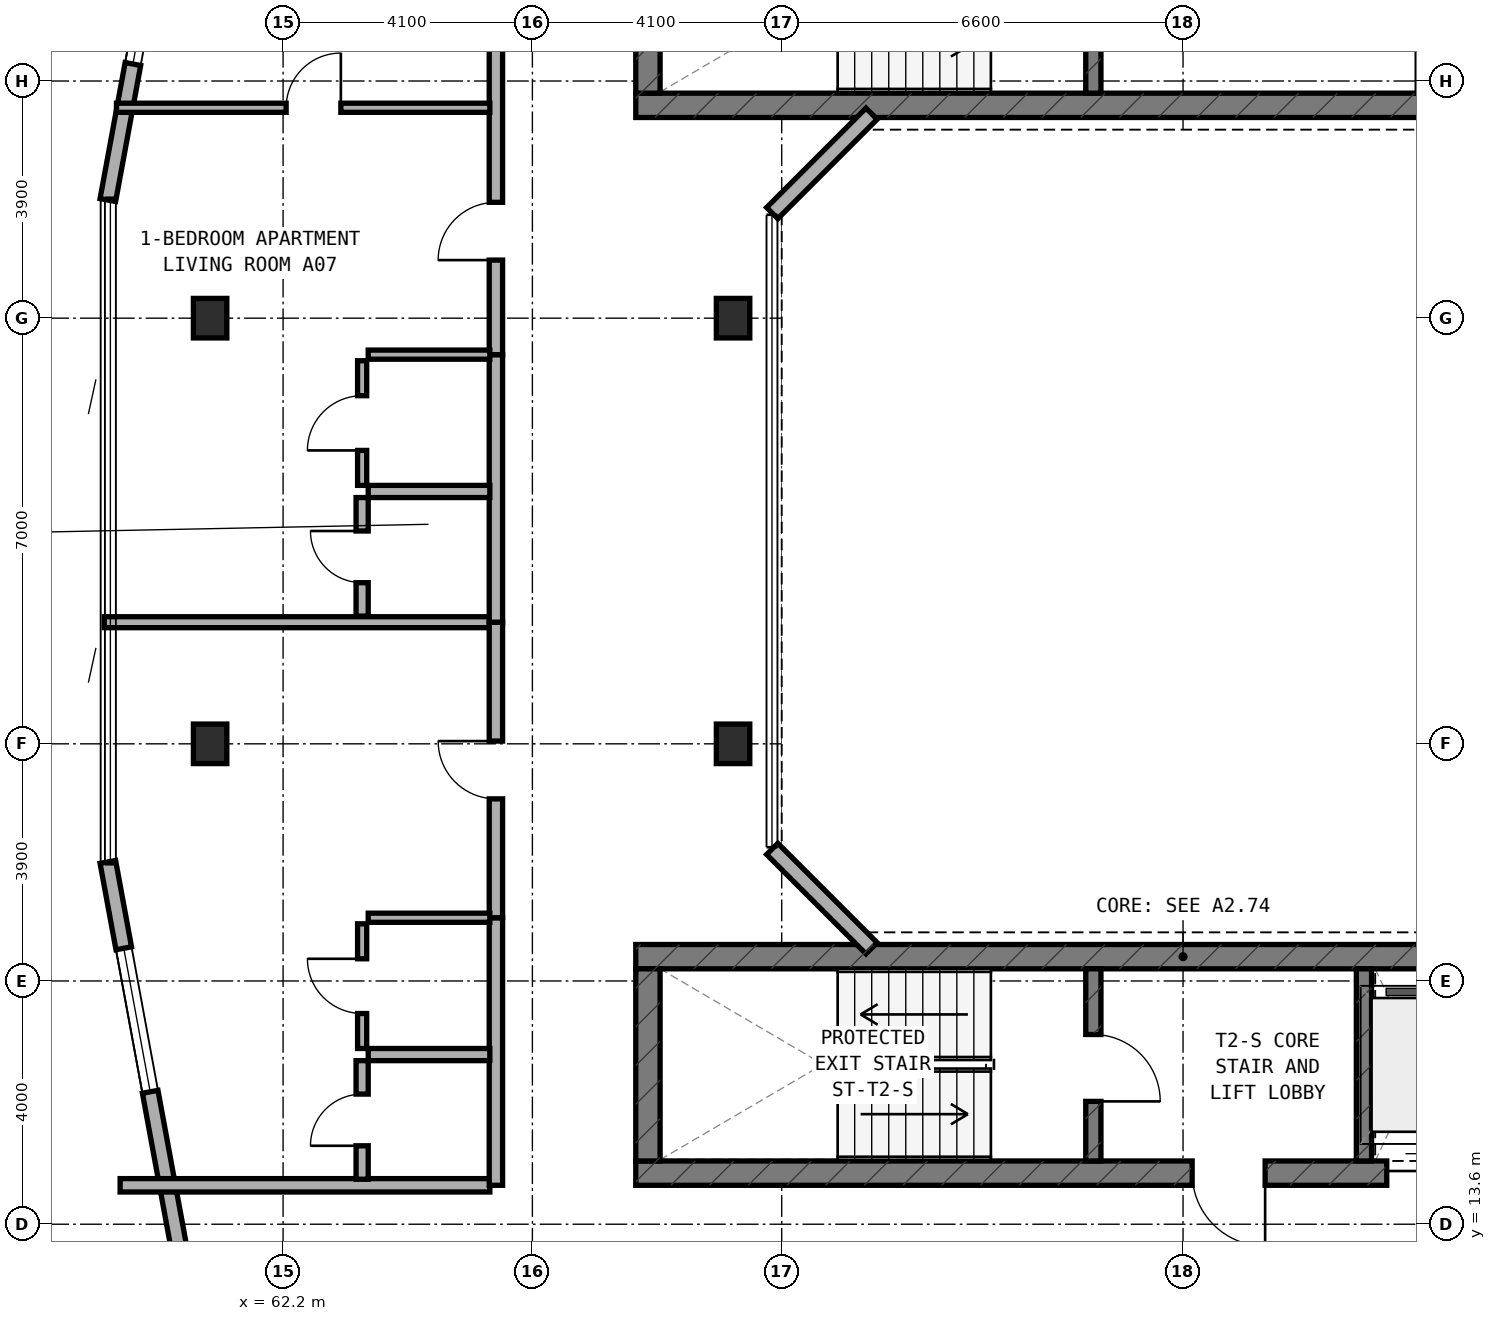
"""IFC4 building model, lengths in metres.
Left out: names, types, materials, properties, quantities, classifications, styles, units other than length and angle.
Written with IfcOpenShell. Run it as: python <this file> out.ifc"""

import sys

from ifc_helpers import new_model, si_unit, direction, frame, frame_2d, origin, origin_2d, place, context, subcontext, project, spatial, rectangle, extrude, element, fill, save


model = new_model("IFC4")
c1 = context("Model", 3, precision=1e-05, world=origin(), true_north=direction((0.0, 1.0)))
c2 = subcontext(c1, "Body", "Model", "MODEL_VIEW")
j1 = project(units=[si_unit("LENGTHUNIT", "METRE"), si_unit("PLANEANGLEUNIT", "RADIAN")], contexts=[c1])
p1 = place(None, origin())
s1 = spatial("IfcSite", under=j1, at=p1, CompositionType="ELEMENT")
p2 = place(p1, origin())
s2 = spatial("IfcBuilding", under=s1, at=p2, CompositionType="ELEMENT")
p3 = place(p2, frame((0.0, 0.0, 109.0)))
s3 = spatial("IfcBuildingStorey", under=s2, at=p3, CompositionType="ELEMENT", Elevation=109.0)
p4 = place(p3, frame((68.0, 32.0, 0.0), z_axis=(0.0, 0.0, 1.0), x_axis=(1.0, 0.0, 0.0)))
e1 = element("IfcWall", 1, at=p4, inside=s3, PredefinedType="SHEAR", context=c2, shape_type="SweptSolid", body=[
    extrude(rectangle(XDim=18.2, YDim=0.4, at=frame_2d((9.1, 0.0))), origin(), (0.0, 0.0, 1.0), 3.5),
])
p5 = place(p3, frame((68.2, 32.2, 0.0), z_axis=(0.0, 0.0, 1.0), x_axis=(0.0, 1.0, 0.0)))
e2 = element("IfcWall", 2, at=p5, inside=s3, PredefinedType="SHEAR", context=c2, shape_type="SweptSolid", body=[
    extrude(rectangle(XDim=3.16, YDim=0.4, at=frame_2d((1.58, 0.0))), origin(), (0.0, 0.0, 1.0), 3.5),
])
p6 = place(p3, frame((75.525, 32.2, 0.0), z_axis=(0.0, 0.0, 1.0), x_axis=(0.0, 1.0, 0.0)))
e3 = element("IfcWall", 3, at=p6, inside=s3, PredefinedType="STANDARD", context=c2, shape_type="SweptSolid", body=[
    extrude(rectangle(XDim=3.16, YDim=0.25, at=frame_2d((1.58, 0.0))), origin(), (0.0, 0.0, 1.0), 3.25),
])
p7 = place(p6, frame((0.98, 0.0, 0.0)))
e4 = element("IfcOpeningElement", 4, at=p7, cuts=e3, PredefinedType="OPENING", context=c2, shape_type="SweptSolid", body=[
    extrude(rectangle(XDim=1.1, YDim=2.15, at=frame_2d((0.55, 1.075))), frame((0.0, 0.135, 0.0), z_axis=(0.0, -1.0, 0.0), x_axis=(1.0, 0.0, 0.0)), (0.0, 0.0, 1.0), 0.27),
])
p8 = place(p3, frame((68.0, 14.44, 0.0), z_axis=(0.0, 0.0, 1.0), x_axis=(1.0, 0.0, 0.0)))
e5 = element("IfcWall", 5, at=p8, inside=s3, PredefinedType="SHEAR", context=c2, shape_type="SweptSolid", body=[
    extrude(rectangle(XDim=18.2, YDim=0.4, at=frame_2d((9.1, 0.0))), origin(), (0.0, 0.0, 1.0), 3.5),
])
p9 = place(p8, frame((9.15, 0.0, 0.0)))
e6 = element("IfcOpeningElement", 6, at=p9, cuts=e5, PredefinedType="OPENING", context=c2, shape_type="SweptSolid", body=[
    extrude(rectangle(XDim=1.2, YDim=2.15, at=frame_2d((0.6, 1.075))), frame((0.0, 0.21, 0.0), z_axis=(0.0, -1.0, 0.0), x_axis=(1.0, 0.0, 0.0)), (0.0, 0.0, 1.0), 0.42),
])
p10 = place(p8, frame((16.75, 0.0, 0.0)))
e7 = element("IfcOpeningElement", 7, at=p10, cuts=e5, PredefinedType="OPENING", context=c2, shape_type="SweptSolid", body=[
    extrude(rectangle(XDim=0.85, YDim=2.1, at=frame_2d((0.425, 1.05))), frame((0.0, 0.21, 0.0), z_axis=(0.0, -1.0, 0.0), x_axis=(1.0, 0.0, 0.0)), (0.0, 0.0, 1.0), 0.42),
])
p11 = place(p8, frame((12.35, 0.0, 0.0)))
e8 = element("IfcOpeningElement", 8, at=p11, cuts=e5, PredefinedType="OPENING", context=c2, shape_type="SweptSolid", body=[
    extrude(rectangle(XDim=1.1, YDim=2.15, at=frame_2d((0.55, 1.075))), frame((0.0, 0.21, 0.0), z_axis=(0.0, -1.0, 0.0), x_axis=(1.0, 0.0, 0.0)), (0.0, 0.0, 1.0), 0.42),
])
p12 = place(p8, frame((13.95, 0.0, 0.0)))
e9 = element("IfcOpeningElement", 9, at=p12, cuts=e5, PredefinedType="OPENING", context=c2, shape_type="SweptSolid", body=[
    extrude(rectangle(XDim=1.1, YDim=2.15, at=frame_2d((0.55, 1.075))), frame((0.0, 0.21, 0.0), z_axis=(0.0, -1.0, 0.0), x_axis=(1.0, 0.0, 0.0)), (0.0, 0.0, 1.0), 0.42),
])
p13 = place(p3, frame((68.0, 18.0, 0.0), z_axis=(0.0, 0.0, 1.0), x_axis=(1.0, 0.0, 0.0)))
e10 = element("IfcWall", 10, at=p13, inside=s3, PredefinedType="SHEAR", context=c2, shape_type="SweptSolid", body=[
    extrude(rectangle(XDim=18.2, YDim=0.4, at=frame_2d((9.1, 0.0))), origin(), (0.0, 0.0, 1.0), 3.5),
])
p14 = place(p3, frame((68.2, 14.64, 0.0), z_axis=(0.0, 0.0, 1.0), x_axis=(0.0, 1.0, 0.0)))
e11 = element("IfcWall", 11, at=p14, inside=s3, PredefinedType="SHEAR", context=c2, shape_type="SweptSolid", body=[
    extrude(rectangle(XDim=3.16, YDim=0.4, at=frame_2d((1.58, 0.0))), origin(), (0.0, 0.0, 1.0), 3.5),
])
p15 = place(p3, frame((75.525, 14.64, 0.0), z_axis=(0.0, 0.0, 1.0), x_axis=(0.0, 1.0, 0.0)))
e12 = element("IfcWall", 12, at=p15, inside=s3, PredefinedType="STANDARD", context=c2, shape_type="SweptSolid", body=[
    extrude(rectangle(XDim=3.16, YDim=0.25, at=frame_2d((1.58, 0.0))), origin(), (0.0, 0.0, 1.0), 3.25),
])
p16 = place(p15, frame((0.98, 0.0, 0.0)))
e13 = element("IfcOpeningElement", 13, at=p16, cuts=e12, PredefinedType="OPENING", context=c2, shape_type="SweptSolid", body=[
    extrude(rectangle(XDim=1.1, YDim=2.15, at=frame_2d((0.55, 1.075))), frame((0.0, 0.135, 0.0), z_axis=(0.0, -1.0, 0.0), x_axis=(1.0, 0.0, 0.0)), (0.0, 0.0, 1.0), 0.27),
])
p17 = place(p3, frame((79.975, 14.64, 0.0), z_axis=(0.0, 0.0, 1.0), x_axis=(0.0, 1.0, 0.0)))
e14 = element("IfcWall", 14, at=p17, inside=s3, PredefinedType="STANDARD", context=c2, shape_type="SweptSolid", body=[
    extrude(rectangle(XDim=3.16, YDim=0.25, at=frame_2d((1.58, 0.0))), origin(), (0.0, 0.0, 1.0), 3.25),
])
for number, where, z_axis, x_axis in (
    (15, (61.0, 21.5, 0.0), (0.0, 0.0, 1.0), (1.0, 0.0, 0.0)),
    (16, (61.0, 28.5, 0.0), (0.0, 0.0, 1.0), (1.0, 0.0, 0.0)),
    (17, (69.6, 21.5, 0.0), (0.0, 0.0, 1.0), (1.0, 0.0, 0.0)),
    (18, (69.6, 28.5, 0.0), (0.0, 0.0, 1.0), (1.0, 0.0, 0.0)),
):
    element("IfcColumn", number, at=place(p3, frame(where, z_axis=z_axis, x_axis=x_axis)), inside=s3, PredefinedType="COLUMN", context=c2, shape_type="SweptSolid", body=[
        extrude(rectangle(XDim=0.55, YDim=0.65, at=origin_2d()), origin(), (0.0, 0.0, 1.0), 3.5),
    ])
p18 = place(p3, frame((60.929, 39.184, 0.0), z_axis=(0.0, 0.0, 1.0), x_axis=(-0.181209963057, -0.983444431215, 0.0)))
e19 = element("IfcWall", 19, at=p18, inside=s3, PredefinedType="STANDARD", context=c2, shape_type="SweptSolid", body=[
    extrude(rectangle(XDim=8.889, YDim=0.26, at=frame_2d((4.445, 0.0))), origin(), (0.0, 0.0, 1.0), 3.25),
])
p19 = place(p18, frame((4.214, 0.0, 0.8)))
e20 = element("IfcOpeningElement", 20, at=p19, cuts=e19, PredefinedType="OPENING", context=c2, shape_type="SweptSolid", body=[
    extrude(rectangle(XDim=2.4, YDim=1.6, at=frame_2d((1.2, 0.8))), frame((0.0, 0.14, 0.0), z_axis=(0.0, -1.0, 0.0), x_axis=(1.0, 0.0, 0.0)), (0.0, 0.0, 1.0), 0.28),
])
p20 = place(p3, frame((59.318, 19.558, 0.0), z_axis=(0.0, 0.0, 1.0), x_axis=(0.181209963057, -0.983444431215, 0.0)))
e21 = element("IfcWall", 21, at=p20, inside=s3, PredefinedType="STANDARD", context=c2, shape_type="SweptSolid", body=[
    extrude(rectangle(XDim=8.889, YDim=0.26, at=frame_2d((4.445, 0.0))), origin(), (0.0, 0.0, 1.0), 3.25),
])
p21 = place(p20, frame((1.444, 0.0, 0.8)))
e22 = element("IfcOpeningElement", 22, at=p21, cuts=e21, PredefinedType="OPENING", context=c2, shape_type="SweptSolid", body=[
    extrude(rectangle(XDim=2.4, YDim=1.6, at=frame_2d((1.2, 0.8))), frame((0.0, 0.14, 0.0), z_axis=(0.0, -1.0, 0.0), x_axis=(1.0, 0.0, 0.0)), (0.0, 0.0, 1.0), 0.28),
])
for number, where, z_axis, x_axis in (
    (23, (71.878, 31.862, 0.0), (0.0, 0.0, 1.0), (-0.707, -0.707, 0.0)),
    (24, (70.244, 19.772, 0.0), (0.0, 0.0, 1.0), (0.707, -0.707, 0.0)),
):
    element("IfcWall", number, at=place(p3, frame(where, z_axis=z_axis, x_axis=x_axis)), inside=s3, PredefinedType="STANDARD", context=c2, shape_type="SweptSolid", body=[
        extrude(rectangle(XDim=2.311, YDim=0.26, at=frame_2d((1.155, 0.0))), origin(), (0.0, 0.0, 1.0), 3.25),
    ])
p22 = place(p3, frame((59.52, 14.24, 0.0), z_axis=(0.0, 0.0, 1.0), x_axis=(1.0, 0.0, 0.0)))
e25 = element("IfcWall", 25, at=p22, inside=s3, PredefinedType="SOLIDWALL", context=c2, shape_type="SweptSolid", body=[
    extrude(rectangle(XDim=6.08, YDim=0.22, at=frame_2d((3.04, 0.0))), origin(), (0.0, 0.0, 1.0), 2.945),
])
p23 = place(p3, frame((59.26, 23.5, 0.0), z_axis=(0.0, 0.0, 1.0), x_axis=(1.0, 0.0, 0.0)))
e26 = element("IfcWall", 26, at=p23, inside=s3, PredefinedType="SOLIDWALL", context=c2, shape_type="SweptSolid", body=[
    extrude(rectangle(XDim=6.44, YDim=0.18, at=frame_2d((3.22, 0.0))), origin(), (0.0, 0.0, 1.0), 2.945),
])
p24 = place(p3, frame((65.7, 14.24, 0.0), z_axis=(0.0, 0.0, 1.0), x_axis=(0.0, 1.0, 0.0)))
e27 = element("IfcWall", 27, at=p24, inside=s3, PredefinedType="SOLIDWALL", context=c2, shape_type="SweptSolid", body=[
    extrude(rectangle(XDim=4.4, YDim=0.22, at=frame_2d((2.2, 0.0))), origin(), (0.0, 0.0, 1.0), 3.22),
])
p25 = place(p3, frame((65.7, 18.64, 0.0), z_axis=(0.0, 0.0, 1.0), x_axis=(0.0, 1.0, 0.0)))
e28 = element("IfcWall", 28, at=p25, inside=s3, PredefinedType="SOLIDWALL", context=c2, shape_type="SweptSolid", body=[
    extrude(rectangle(XDim=4.86, YDim=0.22, at=frame_2d((2.43, 0.0))), origin(), (0.0, 0.0, 1.0), 2.825),
])
p26 = place(p25, frame((1.955, 0.0, 0.0)))
e29 = element("IfcOpeningElement", 29, at=p26, cuts=e28, PredefinedType="OPENING", context=c2, shape_type="SweptSolid", body=[
    extrude(rectangle(XDim=0.95, YDim=2.1, at=frame_2d((0.475, 1.05))), frame((0.0, 0.12, 0.0), z_axis=(0.0, -1.0, 0.0), x_axis=(1.0, 0.0, 0.0)), (0.0, 0.0, 1.0), 0.24),
])
p27 = place(p3, frame((63.6, 16.39, 0.0), z_axis=(0.0, 0.0, 1.0), x_axis=(1.0, 0.0, 0.0)))
e30 = element("IfcWall", 30, at=p27, inside=s3, PredefinedType="PLUMBINGWALL", context=c2, shape_type="SweptSolid", body=[
    extrude(rectangle(XDim=2.0, YDim=0.2, at=frame_2d((1.0, 0.0))), origin(), (0.0, 0.0, 1.0), 3.22),
])
p28 = place(p3, frame((63.6, 18.64, 0.0), z_axis=(0.0, 0.0, 1.0), x_axis=(1.0, 0.0, 0.0)))
e31 = element("IfcWall", 31, at=p28, inside=s3, PredefinedType="PARTITIONING", context=c2, shape_type="SweptSolid", body=[
    extrude(rectangle(XDim=2.0, YDim=0.15, at=frame_2d((1.0, 0.0))), origin(), (0.0, 0.0, 1.0), 3.22),
])
p29 = place(p3, frame((63.5, 14.34, 0.0), z_axis=(0.0, 0.0, 1.0), x_axis=(0.0, 1.0, 0.0)))
e32 = element("IfcWall", 32, at=p29, inside=s3, PredefinedType="PLUMBINGWALL", context=c2, shape_type="SweptSolid", body=[
    extrude(rectangle(XDim=1.95, YDim=0.2, at=frame_2d((0.975, 0.0))), origin(), (0.0, 0.0, 1.0), 3.22),
])
p30 = place(p29, frame((0.55, 0.0, 0.0)))
e33 = element("IfcOpeningElement", 33, at=p30, cuts=e32, PredefinedType="OPENING", context=c2, shape_type="SweptSolid", body=[
    extrude(rectangle(XDim=0.85, YDim=2.1, at=frame_2d((0.425, 1.05))), frame((0.0, 0.11, 0.0), z_axis=(0.0, -1.0, 0.0), x_axis=(1.0, 0.0, 0.0)), (0.0, 0.0, 1.0), 0.22),
])
p31 = place(p3, frame((63.5, 16.49, 0.0), z_axis=(0.0, 0.0, 1.0), x_axis=(0.0, 1.0, 0.0)))
e34 = element("IfcWall", 34, at=p31, inside=s3, PredefinedType="PARTITIONING", context=c2, shape_type="SweptSolid", body=[
    extrude(rectangle(XDim=2.05, YDim=0.15, at=frame_2d((1.025, 0.0))), origin(), (0.0, 0.0, 1.0), 3.22),
])
p32 = place(p31, frame((0.575, 0.0, 0.0)))
e35 = element("IfcOpeningElement", 35, at=p32, cuts=e34, PredefinedType="OPENING", context=c2, shape_type="SweptSolid", body=[
    extrude(rectangle(XDim=0.9, YDim=2.1, at=frame_2d((0.45, 1.05))), frame((0.0, 0.085, 0.0), z_axis=(0.0, -1.0, 0.0), x_axis=(1.0, 0.0, 0.0)), (0.0, 0.0, 1.0), 0.17),
])
p33 = place(p3, frame((65.7, 23.5, 0.0), z_axis=(0.0, 0.0, 1.0), x_axis=(0.0, 1.0, 0.0)))
e36 = element("IfcWall", 36, at=p33, inside=s3, PredefinedType="SOLIDWALL", context=c2, shape_type="SweptSolid", body=[
    extrude(rectangle(XDim=4.4, YDim=0.22, at=frame_2d((2.2, 0.0))), origin(), (0.0, 0.0, 1.0), 3.22),
])
p34 = place(p3, frame((65.7, 27.9, 0.0), z_axis=(0.0, 0.0, 1.0), x_axis=(0.0, 1.0, 0.0)))
e37 = element("IfcWall", 37, at=p34, inside=s3, PredefinedType="SOLIDWALL", context=c2, shape_type="SweptSolid", body=[
    extrude(rectangle(XDim=7.86, YDim=0.22, at=frame_2d((3.93, 0.0))), origin(), (0.0, 0.0, 1.0), 2.825),
])
p35 = place(p34, frame((1.555, 0.0, 0.0)))
e38 = element("IfcOpeningElement", 38, at=p35, cuts=e37, PredefinedType="OPENING", context=c2, shape_type="SweptSolid", body=[
    extrude(rectangle(XDim=0.95, YDim=2.1, at=frame_2d((0.475, 1.05))), frame((0.0, 0.12, 0.0), z_axis=(0.0, -1.0, 0.0), x_axis=(1.0, 0.0, 0.0)), (0.0, 0.0, 1.0), 0.24),
])
p36 = place(p3, frame((59.46, 31.96, 0.0), z_axis=(0.0, 0.0, 1.0), x_axis=(1.0, 0.0, 0.0)))
e39 = element("IfcWall", 39, at=p36, inside=s3, PredefinedType="PARTITIONING", context=c2, shape_type="SweptSolid", body=[
    extrude(rectangle(XDim=6.14, YDim=0.15, at=frame_2d((3.07, 0.0))), origin(), (0.0, 0.0, 1.0), 2.945),
])
p37 = place(p36, frame((2.79, 0.0, 0.0)))
e40 = element("IfcOpeningElement", 40, at=p37, cuts=e39, PredefinedType="OPENING", context=c2, shape_type="SweptSolid", body=[
    extrude(rectangle(XDim=0.9, YDim=2.1, at=frame_2d((0.45, 1.05))), frame((0.0, 0.085, 0.0), z_axis=(0.0, -1.0, 0.0), x_axis=(1.0, 0.0, 0.0)), (0.0, 0.0, 1.0), 0.17),
])
p38 = place(p3, frame((63.6, 25.65, 0.0), z_axis=(0.0, 0.0, 1.0), x_axis=(1.0, 0.0, 0.0)))
e41 = element("IfcWall", 41, at=p38, inside=s3, PredefinedType="PLUMBINGWALL", context=c2, shape_type="SweptSolid", body=[
    extrude(rectangle(XDim=2.0, YDim=0.2, at=frame_2d((1.0, 0.0))), origin(), (0.0, 0.0, 1.0), 3.22),
])
p39 = place(p3, frame((63.6, 27.9, 0.0), z_axis=(0.0, 0.0, 1.0), x_axis=(1.0, 0.0, 0.0)))
e42 = element("IfcWall", 42, at=p39, inside=s3, PredefinedType="PARTITIONING", context=c2, shape_type="SweptSolid", body=[
    extrude(rectangle(XDim=2.0, YDim=0.15, at=frame_2d((1.0, 0.0))), origin(), (0.0, 0.0, 1.0), 3.22),
])
p40 = place(p3, frame((63.5, 23.6, 0.0), z_axis=(0.0, 0.0, 1.0), x_axis=(0.0, 1.0, 0.0)))
e43 = element("IfcWall", 43, at=p40, inside=s3, PredefinedType="PLUMBINGWALL", context=c2, shape_type="SweptSolid", body=[
    extrude(rectangle(XDim=1.95, YDim=0.2, at=frame_2d((0.975, 0.0))), origin(), (0.0, 0.0, 1.0), 3.22),
])
p41 = place(p40, frame((0.55, 0.0, 0.0)))
e44 = element("IfcOpeningElement", 44, at=p41, cuts=e43, PredefinedType="OPENING", context=c2, shape_type="SweptSolid", body=[
    extrude(rectangle(XDim=0.85, YDim=2.1, at=frame_2d((0.425, 1.05))), frame((0.0, 0.11, 0.0), z_axis=(0.0, -1.0, 0.0), x_axis=(1.0, 0.0, 0.0)), (0.0, 0.0, 1.0), 0.22),
])
p42 = place(p3, frame((63.5, 25.75, 0.0), z_axis=(0.0, 0.0, 1.0), x_axis=(0.0, 1.0, 0.0)))
e45 = element("IfcWall", 45, at=p42, inside=s3, PredefinedType="PARTITIONING", context=c2, shape_type="SweptSolid", body=[
    extrude(rectangle(XDim=2.05, YDim=0.15, at=frame_2d((1.025, 0.0))), origin(), (0.0, 0.0, 1.0), 3.22),
])
p43 = place(p42, frame((0.575, 0.0, 0.0)))
e46 = element("IfcOpeningElement", 46, at=p43, cuts=e45, PredefinedType="OPENING", context=c2, shape_type="SweptSolid", body=[
    extrude(rectangle(XDim=0.9, YDim=2.1, at=frame_2d((0.45, 1.05))), frame((0.0, 0.085, 0.0), z_axis=(0.0, -1.0, 0.0), x_axis=(1.0, 0.0, 0.0)), (0.0, 0.0, 1.0), 0.17),
])
p44 = place(p19, origin())
e47 = element("IfcWindow", 47, at=p44, inside=s3, PartitioningType="SINGLE_PANEL", PredefinedType="WINDOW", context=c2, shape_type="SweptSolid", body=[
    extrude(rectangle(XDim=2.4, YDim=1.6, at=frame_2d((1.2, 0.8))), frame((0.0, 0.03, 0.0), z_axis=(0.0, -1.0, 0.0), x_axis=(1.0, 0.0, 0.0)), (0.0, 0.0, 1.0), 0.06),
])
fill(e20, e47)
p45 = place(p21, origin())
e48 = element("IfcWindow", 48, at=p45, inside=s3, PartitioningType="SINGLE_PANEL", PredefinedType="WINDOW", context=c2, shape_type="SweptSolid", body=[
    extrude(rectangle(XDim=2.4, YDim=1.6, at=frame_2d((1.2, 0.8))), frame((0.0, 0.03, 0.0), z_axis=(0.0, -1.0, 0.0), x_axis=(1.0, 0.0, 0.0)), (0.0, 0.0, 1.0), 0.06),
])
fill(e22, e48)
p46 = place(p16, frame((1.1, 0.0, 0.0), z_axis=(0.0, 0.0, 1.0), x_axis=(-1.0, 0.0, 0.0)))
e49 = element("IfcDoor", 49, at=p46, inside=s3, OperationType="SINGLE_SWING_RIGHT", PredefinedType="DOOR", context=c2, shape_type="SweptSolid", body=[
    extrude(rectangle(XDim=1.1, YDim=2.15, at=frame_2d((0.55, 1.075))), frame((0.0, 0.025, 0.0), z_axis=(0.0, -1.0, 0.0), x_axis=(1.0, 0.0, 0.0)), (0.0, 0.0, 1.0), 0.05),
])
fill(e13, e49)
p47 = place(p9, frame((1.2, 0.0, 0.0), z_axis=(0.0, 0.0, 1.0), x_axis=(-1.0, 0.0, 0.0)))
e50 = element("IfcDoor", 50, at=p47, inside=s3, OperationType="SINGLE_SWING_LEFT", PredefinedType="DOOR", context=c2, shape_type="SweptSolid", body=[
    extrude(rectangle(XDim=1.2, YDim=2.15, at=frame_2d((0.6, 1.075))), frame((0.0, 0.025, 0.0), z_axis=(0.0, -1.0, 0.0), x_axis=(1.0, 0.0, 0.0)), (0.0, 0.0, 1.0), 0.05),
])
fill(e6, e50)
p48 = place(p11, frame((1.1, 0.0, 0.0), z_axis=(0.0, 0.0, 1.0), x_axis=(-1.0, 0.0, 0.0)))
e51 = element("IfcDoor", 51, at=p48, inside=s3, OperationType="DOUBLE_DOOR_SLIDING", PredefinedType="DOOR", context=c2, shape_type="SweptSolid", body=[
    extrude(rectangle(XDim=1.1, YDim=2.15, at=frame_2d((0.55, 1.075))), frame((0.0, 0.025, 0.0), z_axis=(0.0, -1.0, 0.0), x_axis=(1.0, 0.0, 0.0)), (0.0, 0.0, 1.0), 0.05),
])
fill(e8, e51)
p49 = place(p26, origin())
e52 = element("IfcDoor", 52, at=p49, inside=s3, OperationType="SINGLE_SWING_RIGHT", PredefinedType="DOOR", context=c2, shape_type="SweptSolid", body=[
    extrude(rectangle(XDim=0.95, YDim=2.1, at=frame_2d((0.475, 1.05))), frame((0.0, 0.025, 0.0), z_axis=(0.0, -1.0, 0.0), x_axis=(1.0, 0.0, 0.0)), (0.0, 0.0, 1.0), 0.05),
])
fill(e29, e52)
p50 = place(p30, origin())
e53 = element("IfcDoor", 53, at=p50, inside=s3, OperationType="SINGLE_SWING_LEFT", PredefinedType="DOOR", context=c2, shape_type="SweptSolid", body=[
    extrude(rectangle(XDim=0.85, YDim=2.1, at=frame_2d((0.425, 1.05))), frame((0.0, 0.025, 0.0), z_axis=(0.0, -1.0, 0.0), x_axis=(1.0, 0.0, 0.0)), (0.0, 0.0, 1.0), 0.05),
])
fill(e33, e53)
p51 = place(p32, origin())
e54 = element("IfcDoor", 54, at=p51, inside=s3, OperationType="SINGLE_SWING_RIGHT", PredefinedType="DOOR", context=c2, shape_type="SweptSolid", body=[
    extrude(rectangle(XDim=0.9, YDim=2.1, at=frame_2d((0.45, 1.05))), frame((0.0, 0.025, 0.0), z_axis=(0.0, -1.0, 0.0), x_axis=(1.0, 0.0, 0.0)), (0.0, 0.0, 1.0), 0.05),
])
fill(e35, e54)
p52 = place(p35, origin())
e55 = element("IfcDoor", 55, at=p52, inside=s3, OperationType="SINGLE_SWING_LEFT", PredefinedType="DOOR", context=c2, shape_type="SweptSolid", body=[
    extrude(rectangle(XDim=0.95, YDim=2.1, at=frame_2d((0.475, 1.05))), frame((0.0, 0.025, 0.0), z_axis=(0.0, -1.0, 0.0), x_axis=(1.0, 0.0, 0.0)), (0.0, 0.0, 1.0), 0.05),
])
fill(e38, e55)
p53 = place(p37, origin())
e56 = element("IfcDoor", 56, at=p53, inside=s3, OperationType="SINGLE_SWING_RIGHT", PredefinedType="DOOR", context=c2, shape_type="SweptSolid", body=[
    extrude(rectangle(XDim=0.9, YDim=2.1, at=frame_2d((0.45, 1.05))), frame((0.0, 0.025, 0.0), z_axis=(0.0, -1.0, 0.0), x_axis=(1.0, 0.0, 0.0)), (0.0, 0.0, 1.0), 0.05),
])
fill(e40, e56)
p54 = place(p41, origin())
e57 = element("IfcDoor", 57, at=p54, inside=s3, OperationType="SINGLE_SWING_RIGHT", PredefinedType="DOOR", context=c2, shape_type="SweptSolid", body=[
    extrude(rectangle(XDim=0.85, YDim=2.1, at=frame_2d((0.425, 1.05))), frame((0.0, 0.025, 0.0), z_axis=(0.0, -1.0, 0.0), x_axis=(1.0, 0.0, 0.0)), (0.0, 0.0, 1.0), 0.05),
])
fill(e44, e57)
p55 = place(p43, origin())
e58 = element("IfcDoor", 58, at=p55, inside=s3, OperationType="SINGLE_SWING_LEFT", PredefinedType="DOOR", context=c2, shape_type="SweptSolid", body=[
    extrude(rectangle(XDim=0.9, YDim=2.1, at=frame_2d((0.45, 1.05))), frame((0.0, 0.025, 0.0), z_axis=(0.0, -1.0, 0.0), x_axis=(1.0, 0.0, 0.0)), (0.0, 0.0, 1.0), 0.05),
])
fill(e46, e58)
save(model, sys.argv[1])
